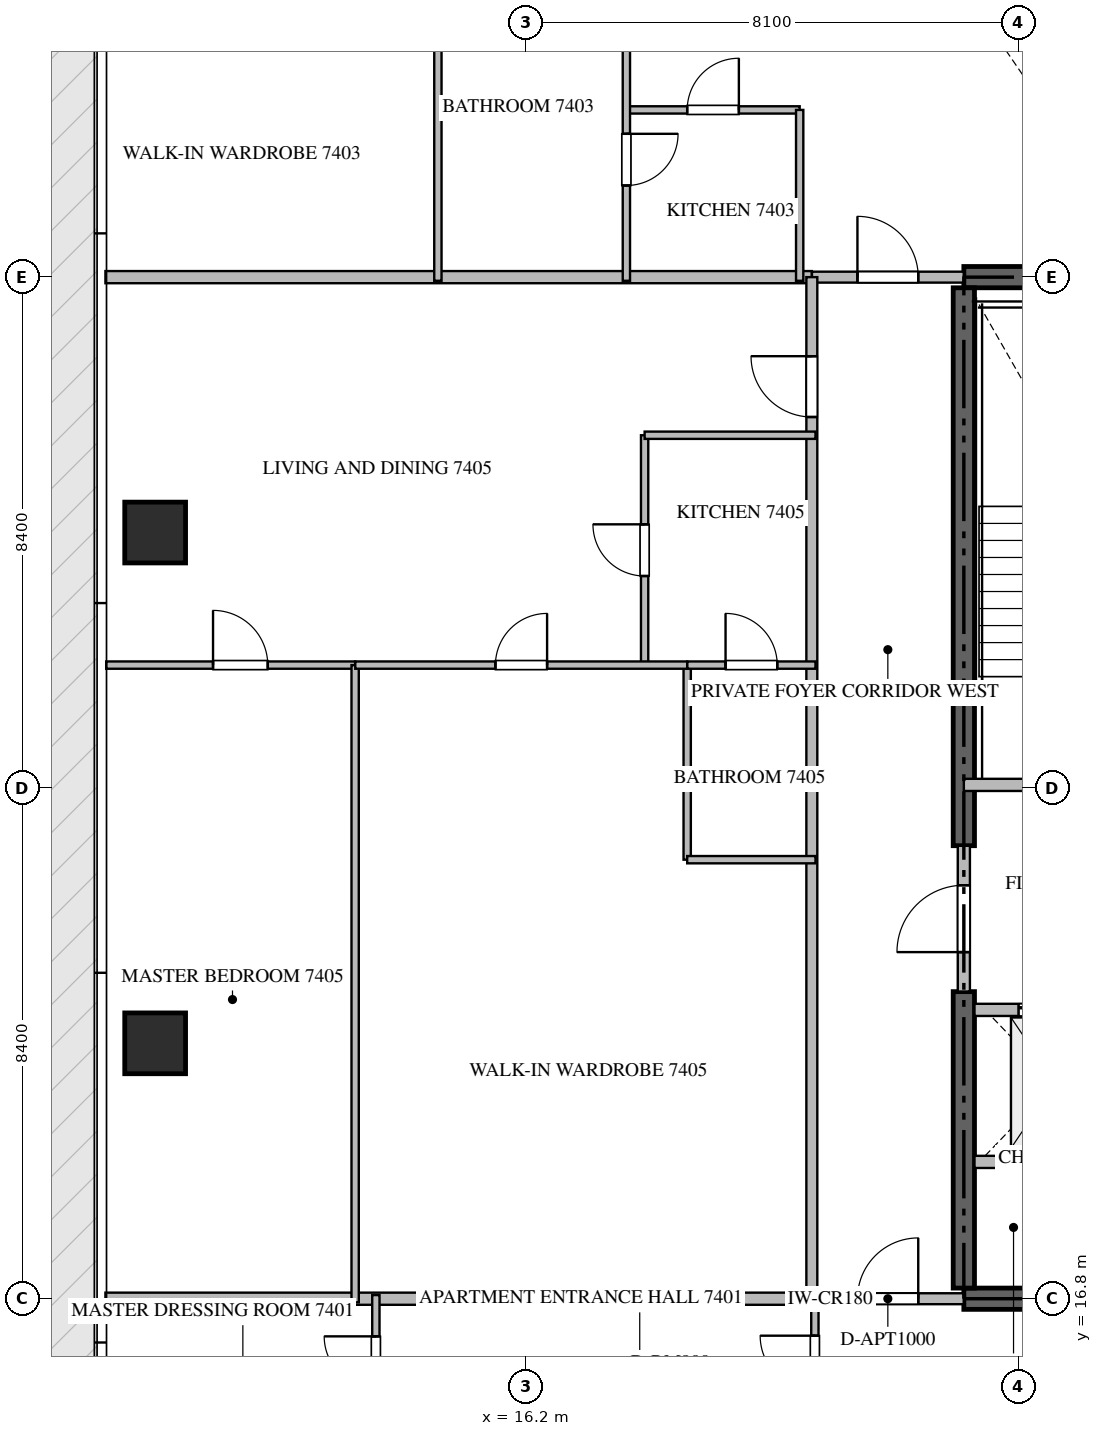
"""IFC4 building model, lengths in metres.
Left out: names, types, materials, properties, quantities, classifications, styles, units other than length and angle.
Written with IfcOpenShell. Run it as: python <this file> out.ifc"""

import sys

from ifc_helpers import new_model, si_unit, direction, frame, frame_2d, origin, origin_2d, place, context, subcontext, project, spatial, rectangle, extrude, source, transform, mapped, element, fill, save


model = new_model("IFC4")
c1 = context("Model", 3, precision=1e-05, world=origin(), true_north=direction((0.0, 1.0)))
c2 = subcontext(c1, "Body", "Model", "MODEL_VIEW")
j1 = project(units=[si_unit("LENGTHUNIT", "METRE"), si_unit("PLANEANGLEUNIT", "RADIAN")], contexts=[c1])
p1 = place(None, origin())
s1 = spatial("IfcSite", under=j1, at=p1, CompositionType="ELEMENT")
p2 = place(p1, origin())
s2 = spatial("IfcBuilding", under=s1, at=p2, CompositionType="ELEMENT")
p3 = place(p2, frame((0.0, 0.0, 297.5)))
s3 = spatial("IfcBuildingStorey", under=s2, at=p3, CompositionType="ELEMENT", Elevation=297.5)
for number, where, z_axis, x_axis in (
    (1, (23.4, 16.8, -0.26), (0.0, 0.0, 1.0), (1.0, 0.0, 0.0)),
    (2, (41.4, 33.6, -0.26), (0.0, 0.0, 1.0), (-1.0, 0.0, 0.0)),
):
    element("IfcWall", number, at=place(p3, frame(where, z_axis=z_axis, x_axis=x_axis)), inside=s3, PredefinedType="SHEAR", context=c2, shape_type="SweptSolid", body=[
        extrude(rectangle(XDim=18.0, YDim=0.35, at=frame_2d((9.0, 0.0))), origin(), (0.0, 0.0, 1.0), 4.048),
    ])
p4 = place(p3, frame((23.4, 16.975, -0.26), z_axis=(0.0, 0.0, 1.0), x_axis=(0.0, 1.0, 0.0)))
e3 = element("IfcWall", 3, at=p4, inside=s3, PredefinedType="SHEAR", context=c2, shape_type="SweptSolid", body=[
    extrude(rectangle(XDim=4.875, YDim=0.35, at=frame_2d((2.438, 0.0))), origin(), (0.0, 0.0, 1.0), 4.048),
])
p5 = place(p3, frame((23.4, 24.25, -0.26), z_axis=(0.0, 0.0, 1.0), x_axis=(0.0, 1.0, 0.0)))
e4 = element("IfcWall", 4, at=p5, inside=s3, PredefinedType="SHEAR", context=c2, shape_type="SweptSolid", body=[
    extrude(rectangle(XDim=9.175, YDim=0.35, at=frame_2d((4.587, 0.0))), origin(), (0.0, 0.0, 1.0), 4.048),
])
m1 = source(origin(), c2, "Body", "SweptSolid", [
    extrude(rectangle(XDim=1.0, YDim=1.0, at=origin_2d()), origin(), (0.0, 0.0, 1.0), 4.05),
])
for number, where, z_axis, x_axis in (
    (5, (10.1, 21.0, -0.26), (0.0, 0.0, 1.0), (1.0, 0.0, 0.0)),
    (6, (10.1, 29.4, -0.26), (0.0, 0.0, 1.0), (1.0, 0.0, 0.0)),
):
    element("IfcColumn", number, at=place(p3, frame(where, z_axis=z_axis, x_axis=x_axis)), inside=s3, PredefinedType="COLUMN", context=c2, shape_type="MappedRepresentation", body=[
        mapped(m1, transform((0.0, 0.0, 0.0), scale=1.0)),
    ])
p6 = place(p3, frame((23.4, 25.25, 0.0), z_axis=(0.0, 0.0, 1.0), x_axis=(1.0, 0.0, 0.0)))
e7 = element("IfcWall", 7, at=p6, inside=s3, PredefinedType="STANDARD", context=c2, shape_type="SweptSolid", body=[
    extrude(rectangle(XDim=4.45, YDim=0.2, at=frame_2d((2.225, 0.0))), origin(), (0.0, 0.0, 1.0), 3.79),
])
p7 = place(p6, frame((1.65, 0.0, 0.0)))
e8 = element("IfcOpeningElement", 8, at=p7, cuts=e7, PredefinedType="OPENING", context=c2, shape_type="SweptSolid", body=[
    extrude(rectangle(XDim=1.1, YDim=2.15, at=frame_2d((0.55, 1.075))), frame((0.0, 0.11, 0.0), z_axis=(0.0, -1.0, 0.0), x_axis=(1.0, 0.0, 0.0)), (0.0, 0.0, 1.0), 0.22),
])
p8 = place(p3, frame((23.575, 21.55, 0.0), z_axis=(0.0, 0.0, 1.0), x_axis=(1.0, 0.0, 0.0)))
e9 = element("IfcWall", 9, at=p8, inside=s3, PredefinedType="STANDARD", context=c2, shape_type="SweptSolid", body=[
    extrude(rectangle(XDim=2.475, YDim=0.2, at=frame_2d((1.238, 0.0))), origin(), (0.0, 0.0, 1.0), 3.79),
])
p9 = place(p8, frame((0.725, 0.0, 0.0)))
e10 = element("IfcOpeningElement", 10, at=p9, cuts=e9, PredefinedType="OPENING", context=c2, shape_type="SweptSolid", body=[
    extrude(rectangle(XDim=1.2, YDim=2.2, at=frame_2d((0.6, 1.1))), frame((0.0, 0.11, 0.0), z_axis=(0.0, -1.0, 0.0), x_axis=(1.0, 0.0, 0.0)), (0.0, 0.0, 1.0), 0.22),
])
p10 = place(p3, frame((23.575, 19.05, 0.0), z_axis=(0.0, 0.0, 1.0), x_axis=(1.0, 0.0, 0.0)))
e11 = element("IfcWall", 11, at=p10, inside=s3, PredefinedType="STANDARD", context=c2, shape_type="SweptSolid", body=[
    extrude(rectangle(XDim=2.475, YDim=0.2, at=frame_2d((1.238, 0.0))), origin(), (0.0, 0.0, 1.0), 3.79),
])
p11 = place(p3, frame((23.4, 21.852, 0.0), z_axis=(0.0, 0.0, 1.0), x_axis=(0.0, 1.0, 0.0)))
e12 = element("IfcWall", 12, at=p11, inside=s3, PredefinedType="STANDARD", context=c2, shape_type="SweptSolid", body=[
    extrude(rectangle(XDim=2.396, YDim=0.2, at=frame_2d((1.198, 0.0))), origin(), (0.0, 0.0, 1.0), 3.79),
])
p12 = place(p11, frame((0.648, 0.0, 0.0)))
e13 = element("IfcOpeningElement", 13, at=p12, cuts=e12, PredefinedType="OPENING", context=c2, shape_type="SweptSolid", body=[
    extrude(rectangle(XDim=1.1, YDim=2.15, at=frame_2d((0.55, 1.075))), frame((0.0, 0.11, 0.0), z_axis=(0.0, -1.0, 0.0), x_axis=(1.0, 0.0, 0.0)), (0.0, 0.0, 1.0), 0.22),
])
for number, where, z_axis, x_axis in (
    (14, (9.282, 16.8, 0.0), (0.0, 0.0, 1.0), (1.0, 0.0, 0.0)),
    (15, (9.282, 33.6, 0.0), (0.0, 0.0, 1.0), (1.0, 0.0, 0.0)),
):
    element("IfcWall", number, at=place(p3, frame(where, z_axis=z_axis, x_axis=x_axis)), inside=s3, PredefinedType="PARTITIONING", context=c2, shape_type="SweptSolid", body=[
        extrude(rectangle(XDim=11.618, YDim=0.2, at=frame_2d((5.809, 0.0))), origin(), (0.0, 0.0, 1.0), 3.79),
    ])
p13 = place(p3, frame((20.902, 16.8, 0.0), z_axis=(0.0, 0.0, 1.0), x_axis=(1.0, 0.0, 0.0)))
e16 = element("IfcWall", 16, at=p13, inside=s3, PredefinedType="PARTITIONING", context=c2, shape_type="SweptSolid", body=[
    extrude(rectangle(XDim=2.496, YDim=0.18, at=frame_2d((1.248, 0.0))), origin(), (0.0, 0.0, 1.0), 3.79),
])
p14 = place(p13, frame((0.748, 0.0, 0.0)))
e17 = element("IfcOpeningElement", 17, at=p14, cuts=e16, PredefinedType="OPENING", context=c2, shape_type="SweptSolid", body=[
    extrude(rectangle(XDim=1.0, YDim=2.15, at=frame_2d((0.5, 1.075))), frame((0.0, 0.1, 0.0), z_axis=(0.0, -1.0, 0.0), x_axis=(1.0, 0.0, 0.0)), (0.0, 0.0, 1.0), 0.2),
])
p15 = place(p3, frame((20.902, 33.6, 0.0), z_axis=(0.0, 0.0, 1.0), x_axis=(1.0, 0.0, 0.0)))
e18 = element("IfcWall", 18, at=p15, inside=s3, PredefinedType="PARTITIONING", context=c2, shape_type="SweptSolid", body=[
    extrude(rectangle(XDim=2.496, YDim=0.18, at=frame_2d((1.248, 0.0))), origin(), (0.0, 0.0, 1.0), 3.79),
])
p16 = place(p15, frame((0.748, 0.0, 0.0)))
e19 = element("IfcOpeningElement", 19, at=p16, cuts=e18, PredefinedType="OPENING", context=c2, shape_type="SweptSolid", body=[
    extrude(rectangle(XDim=1.0, YDim=2.15, at=frame_2d((0.5, 1.075))), frame((0.0, 0.1, 0.0), z_axis=(0.0, -1.0, 0.0), x_axis=(1.0, 0.0, 0.0)), (0.0, 0.0, 1.0), 0.2),
])
p17 = place(p3, frame((20.9, 16.8, 0.0), z_axis=(0.0, 0.0, 1.0), x_axis=(0.0, 1.0, 0.0)))
e20 = element("IfcWall", 20, at=p17, inside=s3, PredefinedType="PARTITIONING", context=c2, shape_type="SweptSolid", body=[
    extrude(rectangle(XDim=16.8, YDim=0.18, at=frame_2d((8.4, 0.0))), origin(), (0.0, 0.0, 1.0), 3.79),
])
p18 = place(p17, frame((14.5, 0.0, 0.0)))
e21 = element("IfcOpeningElement", 21, at=p18, cuts=e20, PredefinedType="OPENING", context=c2, shape_type="SweptSolid", body=[
    extrude(rectangle(XDim=1.0, YDim=2.15, at=frame_2d((0.5, 1.075))), frame((0.0, 0.1, 0.0), z_axis=(0.0, -1.0, 0.0), x_axis=(1.0, 0.0, 0.0)), (0.0, 0.0, 1.0), 0.2),
])
p19 = place(p3, frame((20.95, 14.65, 0.0), z_axis=(0.0, 0.0, 1.0), x_axis=(0.0, 1.0, 0.0)))
e22 = element("IfcWall", 22, at=p19, inside=s3, PredefinedType="PARTITIONING", context=c2, shape_type="SweptSolid", body=[
    extrude(rectangle(XDim=2.148, YDim=0.12, at=frame_2d((1.074, 0.0))), origin(), (0.0, 0.0, 1.0), 3.79),
])
p20 = place(p19, frame((0.642, 0.0, 0.0)))
e23 = element("IfcOpeningElement", 23, at=p20, cuts=e22, PredefinedType="OPENING", context=c2, shape_type="SweptSolid", body=[
    extrude(rectangle(XDim=0.9, YDim=2.1, at=frame_2d((0.45, 1.05))), frame((0.0, 0.07, 0.0), z_axis=(0.0, -1.0, 0.0), x_axis=(1.0, 0.0, 0.0)), (0.0, 0.0, 1.0), 0.14),
])
p21 = place(p3, frame((13.73, 14.652, 0.0), z_axis=(0.0, 0.0, 1.0), x_axis=(0.0, 1.0, 0.0)))
e24 = element("IfcWall", 24, at=p21, inside=s3, PredefinedType="PARTITIONING", context=c2, shape_type="SweptSolid", body=[
    extrude(rectangle(XDim=2.208, YDim=0.12, at=frame_2d((1.104, 0.0))), origin(), (0.0, 0.0, 1.0), 3.79),
])
p22 = place(p21, frame((0.679, 0.0, 0.0)))
e25 = element("IfcOpeningElement", 25, at=p22, cuts=e24, PredefinedType="OPENING", context=c2, shape_type="SweptSolid", body=[
    extrude(rectangle(XDim=0.85, YDim=2.1, at=frame_2d((0.425, 1.05))), frame((0.0, 0.07, 0.0), z_axis=(0.0, -1.0, 0.0), x_axis=(1.0, 0.0, 0.0)), (0.0, 0.0, 1.0), 0.14),
])
p23 = place(p3, frame((17.85, 36.35, 0.0), z_axis=(0.0, 0.0, 1.0), x_axis=(1.0, 0.0, 0.0)))
e26 = element("IfcWall", 26, at=p23, inside=s3, PredefinedType="PARTITIONING", context=c2, shape_type="SweptSolid", body=[
    extrude(rectangle(XDim=2.85, YDim=0.12, at=frame_2d((1.425, 0.0))), origin(), (0.0, 0.0, 1.0), 3.472),
])
p24 = place(p23, frame((1.0, 0.0, 0.0)))
e27 = element("IfcOpeningElement", 27, at=p24, cuts=e26, PredefinedType="OPENING", context=c2, shape_type="SweptSolid", body=[
    extrude(rectangle(XDim=0.85, YDim=2.1, at=frame_2d((0.425, 1.05))), frame((0.0, 0.07, 0.0), z_axis=(0.0, -1.0, 0.0), x_axis=(1.0, 0.0, 0.0)), (0.0, 0.0, 1.0), 0.14),
])
p25 = place(p3, frame((20.7, 36.35, 0.0), z_axis=(0.0, 0.0, 1.0), x_axis=(0.0, -1.0, 0.0)))
e28 = element("IfcWall", 28, at=p25, inside=s3, PredefinedType="PARTITIONING", context=c2, shape_type="SweptSolid", body=[
    extrude(rectangle(XDim=2.81, YDim=0.12, at=frame_2d((1.405, 0.0))), origin(), (0.0, 0.0, 1.0), 3.79),
])
p26 = place(p3, frame((14.75, 37.807, 0.0), z_axis=(0.0, 0.0, 1.0), x_axis=(0.0, -1.0, 0.0)))
e29 = element("IfcWall", 29, at=p26, inside=s3, PredefinedType="PARTITIONING", context=c2, shape_type="SweptSolid", body=[
    extrude(rectangle(XDim=4.267, YDim=0.12, at=frame_2d((2.133, 0.0))), origin(), (0.0, 0.0, 1.0), 3.79),
])
p27 = place(p3, frame((17.85, 37.805, 0.0), z_axis=(0.0, 0.0, 1.0), x_axis=(0.0, -1.0, 0.0)))
e30 = element("IfcWall", 30, at=p27, inside=s3, PredefinedType="PARTITIONING", context=c2, shape_type="SweptSolid", body=[
    extrude(rectangle(XDim=4.265, YDim=0.12, at=frame_2d((2.132, 0.0))), origin(), (0.0, 0.0, 1.0), 3.372),
])
p28 = place(p27, frame((1.848, 0.0, 0.0)))
e31 = element("IfcOpeningElement", 31, at=p28, cuts=e30, PredefinedType="OPENING", context=c2, shape_type="SweptSolid", body=[
    extrude(rectangle(XDim=0.85, YDim=2.1, at=frame_2d((0.425, 1.05))), frame((0.0, 0.07, 0.0), z_axis=(0.0, -1.0, 0.0), x_axis=(1.0, 0.0, 0.0)), (0.0, 0.0, 1.0), 0.14),
])
p29 = place(p3, frame((18.15, 27.22, 0.0), z_axis=(0.0, 0.0, 1.0), x_axis=(0.0, 1.0, 0.0)))
e32 = element("IfcWall", 32, at=p29, inside=s3, PredefinedType="PARTITIONING", context=c2, shape_type="SweptSolid", body=[
    extrude(rectangle(XDim=3.78, YDim=0.12, at=frame_2d((1.89, 0.0))), origin(), (0.0, 0.0, 1.0), 3.79),
])
p30 = place(p29, frame((1.465, 0.0, 0.0)))
e33 = element("IfcOpeningElement", 33, at=p30, cuts=e32, PredefinedType="OPENING", context=c2, shape_type="SweptSolid", body=[
    extrude(rectangle(XDim=0.85, YDim=2.1, at=frame_2d((0.425, 1.05))), frame((0.0, 0.07, 0.0), z_axis=(0.0, -1.0, 0.0), x_axis=(1.0, 0.0, 0.0)), (0.0, 0.0, 1.0), 0.14),
])
p31 = place(p3, frame((18.15, 31.0, 0.0), z_axis=(0.0, 0.0, 1.0), x_axis=(1.0, 0.0, 0.0)))
e34 = element("IfcWall", 34, at=p31, inside=s3, PredefinedType="PARTITIONING", context=c2, shape_type="SweptSolid", body=[
    extrude(rectangle(XDim=2.81, YDim=0.12, at=frame_2d((1.405, 0.0))), origin(), (0.0, 0.0, 1.0), 3.79),
])
p32 = place(p3, frame((9.295, 27.22, 0.0), z_axis=(0.0, 0.0, 1.0), x_axis=(1.0, 0.0, 0.0)))
e35 = element("IfcWall", 35, at=p32, inside=s3, PredefinedType="PARTITIONING", context=c2, shape_type="SweptSolid", body=[
    extrude(rectangle(XDim=4.094, YDim=0.12, at=frame_2d((2.047, 0.0))), origin(), (0.0, 0.0, 1.0), 3.79),
])
p33 = place(p32, frame((1.757, 0.0, 0.0)))
e36 = element("IfcOpeningElement", 36, at=p33, cuts=e35, PredefinedType="OPENING", context=c2, shape_type="SweptSolid", body=[
    extrude(rectangle(XDim=0.9, YDim=2.1, at=frame_2d((0.45, 1.05))), frame((0.0, 0.07, 0.0), z_axis=(0.0, -1.0, 0.0), x_axis=(1.0, 0.0, 0.0)), (0.0, 0.0, 1.0), 0.14),
])
p34 = place(p3, frame((13.389, 16.74, 0.0), z_axis=(0.0, 0.0, 1.0), x_axis=(0.0, 1.0, 0.0)))
e37 = element("IfcWall", 37, at=p34, inside=s3, PredefinedType="PARTITIONING", context=c2, shape_type="SweptSolid", body=[
    extrude(rectangle(XDim=10.48, YDim=0.12, at=frame_2d((5.24, 0.0))), origin(), (0.0, 0.0, 1.0), 3.79),
])
p35 = place(p3, frame((18.85, 24.02, 0.0), z_axis=(0.0, 0.0, 1.0), x_axis=(0.0, 1.0, 0.0)))
e38 = element("IfcWall", 38, at=p35, inside=s3, PredefinedType="PARTITIONING", context=c2, shape_type="SweptSolid", body=[
    extrude(rectangle(XDim=3.2, YDim=0.12, at=frame_2d((1.6, 0.0))), origin(), (0.0, 0.0, 1.0), 3.79),
])
p36 = place(p3, frame((18.85, 24.02, 0.0), z_axis=(0.0, 0.0, 1.0), x_axis=(1.0, 0.0, 0.0)))
e39 = element("IfcWall", 39, at=p36, inside=s3, PredefinedType="PARTITIONING", context=c2, shape_type="SweptSolid", body=[
    extrude(rectangle(XDim=2.11, YDim=0.12, at=frame_2d((1.055, 0.0))), origin(), (0.0, 0.0, 1.0), 3.79),
])
p37 = place(p3, frame((13.391, 27.22, 0.0), z_axis=(0.0, 0.0, 1.0), x_axis=(1.0, 0.0, 0.0)))
e40 = element("IfcWall", 40, at=p37, inside=s3, PredefinedType="PARTITIONING", context=c2, shape_type="SweptSolid", body=[
    extrude(rectangle(XDim=5.459, YDim=0.12, at=frame_2d((2.729, 0.0))), origin(), (0.0, 0.0, 1.0), 3.79),
])
p38 = place(p37, frame((2.305, 0.0, 0.0)))
e41 = element("IfcOpeningElement", 41, at=p38, cuts=e40, PredefinedType="OPENING", context=c2, shape_type="SweptSolid", body=[
    extrude(rectangle(XDim=0.85, YDim=2.1, at=frame_2d((0.425, 1.05))), frame((0.0, 0.07, 0.0), z_axis=(0.0, -1.0, 0.0), x_axis=(1.0, 0.0, 0.0)), (0.0, 0.0, 1.0), 0.14),
])
p39 = place(p3, frame((18.852, 27.22, 0.0), z_axis=(0.0, 0.0, 1.0), x_axis=(1.0, 0.0, 0.0)))
e42 = element("IfcWall", 42, at=p39, inside=s3, PredefinedType="PARTITIONING", context=c2, shape_type="SweptSolid", body=[
    extrude(rectangle(XDim=2.108, YDim=0.12, at=frame_2d((1.054, 0.0))), origin(), (0.0, 0.0, 1.0), 3.79),
])
p40 = place(p39, frame((0.629, 0.0, 0.0)))
e43 = element("IfcOpeningElement", 43, at=p40, cuts=e42, PredefinedType="OPENING", context=c2, shape_type="SweptSolid", body=[
    extrude(rectangle(XDim=0.85, YDim=2.1, at=frame_2d((0.425, 1.05))), frame((0.0, 0.07, 0.0), z_axis=(0.0, -1.0, 0.0), x_axis=(1.0, 0.0, 0.0)), (0.0, 0.0, 1.0), 0.14),
])
m2 = source(origin(), c2, "Body", "SweptSolid", [
    extrude(rectangle(XDim=1.2, YDim=2.2, at=frame_2d((0.6, 1.1))), frame((0.0, 0.025, 0.0), z_axis=(0.0, -1.0, 0.0), x_axis=(1.0, 0.0, 0.0)), (0.0, 0.0, 1.0), 0.05),
])
p41 = place(p9, origin())
e44 = element("IfcDoor", 44, at=p41, inside=s3, OperationType="DOUBLE_DOOR_SLIDING", PredefinedType="DOOR", context=c2, shape_type="MappedRepresentation", body=[
    mapped(m2, transform((0.0, 0.0, 0.0), scale=1.0)),
])
fill(e10, e44)
m3 = source(origin(), c2, "Body", "SweptSolid", [
    extrude(rectangle(XDim=1.1, YDim=2.15, at=frame_2d((0.55, 1.075))), frame((0.0, 0.025, 0.0), z_axis=(0.0, -1.0, 0.0), x_axis=(1.0, 0.0, 0.0)), (0.0, 0.0, 1.0), 0.05),
])
p42 = place(p12, origin())
e45 = element("IfcDoor", 45, at=p42, inside=s3, OperationType="SINGLE_SWING_LEFT", PredefinedType="DOOR", context=c2, shape_type="MappedRepresentation", body=[
    mapped(m3, transform((0.0, 0.0, 0.0), scale=1.0)),
])
fill(e13, e45)
m4 = source(origin(), c2, "Body", "SweptSolid", [
    extrude(rectangle(XDim=1.0, YDim=2.15, at=frame_2d((0.5, 1.075))), frame((0.0, 0.025, 0.0), z_axis=(0.0, -1.0, 0.0), x_axis=(1.0, 0.0, 0.0)), (0.0, 0.0, 1.0), 0.05),
])
p43 = place(p14, origin())
e46 = element("IfcDoor", 46, at=p43, inside=s3, OperationType="SINGLE_SWING_RIGHT", PredefinedType="DOOR", context=c2, shape_type="MappedRepresentation", body=[
    mapped(m4, transform((0.0, 0.0, 0.0), scale=1.0)),
])
fill(e17, e46)
p44 = place(p16, origin())
e47 = element("IfcDoor", 47, at=p44, inside=s3, OperationType="SINGLE_SWING_LEFT", PredefinedType="DOOR", context=c2, shape_type="MappedRepresentation", body=[
    mapped(m4, transform((0.0, 0.0, 0.0), scale=1.0)),
])
fill(e19, e47)
p45 = place(p18, origin())
e48 = element("IfcDoor", 48, at=p45, inside=s3, OperationType="SINGLE_SWING_RIGHT", PredefinedType="DOOR", context=c2, shape_type="MappedRepresentation", body=[
    mapped(m4, transform((0.0, 0.0, 0.0), scale=1.0)),
])
fill(e21, e48)
m5 = source(origin(), c2, "Body", "SweptSolid", [
    extrude(rectangle(XDim=0.9, YDim=2.1, at=frame_2d((0.45, 1.05))), frame((0.0, 0.025, 0.0), z_axis=(0.0, -1.0, 0.0), x_axis=(1.0, 0.0, 0.0)), (0.0, 0.0, 1.0), 0.05),
])
p46 = place(p20, origin())
e49 = element("IfcDoor", 49, at=p46, inside=s3, OperationType="SINGLE_SWING_RIGHT", PredefinedType="DOOR", context=c2, shape_type="MappedRepresentation", body=[
    mapped(m5, transform((0.0, 0.0, 0.0), scale=1.0)),
])
fill(e23, e49)
m6 = source(origin(), c2, "Body", "SweptSolid", [
    extrude(rectangle(XDim=0.85, YDim=2.1, at=frame_2d((0.425, 1.05))), frame((0.0, 0.025, 0.0), z_axis=(0.0, -1.0, 0.0), x_axis=(1.0, 0.0, 0.0)), (0.0, 0.0, 1.0), 0.05),
])
p47 = place(p22, origin())
e50 = element("IfcDoor", 50, at=p47, inside=s3, OperationType="SINGLE_SWING_RIGHT", PredefinedType="DOOR", context=c2, shape_type="MappedRepresentation", body=[
    mapped(m6, transform((0.0, 0.0, 0.0), scale=1.0)),
])
fill(e25, e50)
p48 = place(p24, origin())
e51 = element("IfcDoor", 51, at=p48, inside=s3, OperationType="SINGLE_SWING_RIGHT", PredefinedType="DOOR", context=c2, shape_type="MappedRepresentation", body=[
    mapped(m6, transform((0.0, 0.0, 0.0), scale=1.0)),
])
fill(e27, e51)
p49 = place(p28, origin())
e52 = element("IfcDoor", 52, at=p49, inside=s3, OperationType="SINGLE_SWING_LEFT", PredefinedType="DOOR", context=c2, shape_type="MappedRepresentation", body=[
    mapped(m6, transform((0.0, 0.0, 0.0), scale=1.0)),
])
fill(e31, e52)
p50 = place(p30, origin())
e53 = element("IfcDoor", 53, at=p50, inside=s3, OperationType="SINGLE_SWING_RIGHT", PredefinedType="DOOR", context=c2, shape_type="MappedRepresentation", body=[
    mapped(m6, transform((0.0, 0.0, 0.0), scale=1.0)),
])
fill(e33, e53)
p51 = place(p33, origin())
e54 = element("IfcDoor", 54, at=p51, inside=s3, OperationType="SINGLE_SWING_LEFT", PredefinedType="DOOR", context=c2, shape_type="MappedRepresentation", body=[
    mapped(m5, transform((0.0, 0.0, 0.0), scale=1.0)),
])
fill(e36, e54)
p52 = place(p38, origin())
e55 = element("IfcDoor", 55, at=p52, inside=s3, OperationType="SINGLE_SWING_RIGHT", PredefinedType="DOOR", context=c2, shape_type="MappedRepresentation", body=[
    mapped(m6, transform((0.0, 0.0, 0.0), scale=1.0)),
])
fill(e41, e55)
p53 = place(p40, origin())
e56 = element("IfcDoor", 56, at=p53, inside=s3, OperationType="SINGLE_SWING_LEFT", PredefinedType="DOOR", context=c2, shape_type="MappedRepresentation", body=[
    mapped(m6, transform((0.0, 0.0, 0.0), scale=1.0)),
])
fill(e43, e56)
save(model, sys.argv[1])
